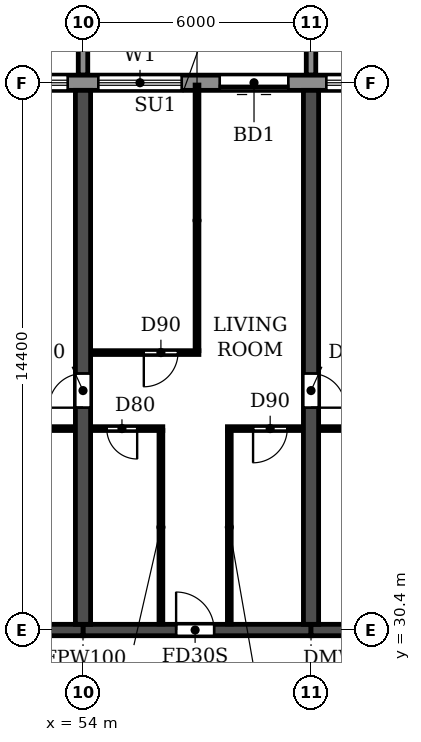
"""IFC4 building model, lengths in metres.
Left out: names, types, materials, properties, quantities, classifications, styles, units other than length and angle.
Written with IfcOpenShell. Run it as: python <this file> out.ifc"""

import sys

from ifc_helpers import new_model, si_unit, direction, frame, frame_2d, origin, place, context, subcontext, project, spatial, polyline, rectangle, outline, extrude, source, transform, mapped, element, fill, save


model = new_model("IFC4")
c1 = context("Model", 3, precision=1e-05, world=origin(), true_north=direction((0.0, 1.0)))
c2 = subcontext(c1, "Body", "Model", "MODEL_VIEW")
j1 = project(units=[si_unit("LENGTHUNIT", "METRE"), si_unit("PLANEANGLEUNIT", "RADIAN")], contexts=[c1])
p1 = place(None, origin())
s1 = spatial("IfcSite", under=j1, at=p1, CompositionType="ELEMENT")
p2 = place(p1, origin())
s2 = spatial("IfcBuilding", under=s1, at=p2, CompositionType="ELEMENT")
p3 = place(p2, frame((0.0, 0.0, 49.8)))
s3 = spatial("IfcBuildingStorey", under=s2, at=p3, CompositionType="ELEMENT", Elevation=49.8)
p4 = place(p3, frame((54.0, 30.55, 0.0), z_axis=(0.0, 0.0, 1.0), x_axis=(0.0, 1.0, 0.0)))
e1 = element("IfcWall", 1, at=p4, inside=s3, PredefinedType="SHEAR", context=c2, shape_type="SweptSolid", body=[
    extrude(rectangle(XDim=14.05, YDim=0.4, at=frame_2d((7.025, 0.0))), origin(), (0.0, 0.0, 1.0), 3.0),
])
p5 = place(p4, frame((5.7, 0.0, 0.0)))
e2 = element("IfcOpeningElement", 2, at=p5, cuts=e1, PredefinedType="OPENING", context=c2, shape_type="SweptSolid", body=[
    extrude(rectangle(XDim=0.9, YDim=2.1, at=frame_2d((0.45, 1.05))), frame((0.0, 0.21, 0.0), z_axis=(0.0, -1.0, 0.0), x_axis=(1.0, 0.0, 0.0)), (0.0, 0.0, 1.0), 0.42),
])
p6 = place(p3, frame((60.0, 30.55, 0.0), z_axis=(0.0, 0.0, 1.0), x_axis=(0.0, 1.0, 0.0)))
e3 = element("IfcWall", 3, at=p6, inside=s3, PredefinedType="SHEAR", context=c2, shape_type="SweptSolid", body=[
    extrude(rectangle(XDim=14.05, YDim=0.4, at=frame_2d((7.025, 0.0))), origin(), (0.0, 0.0, 1.0), 3.0),
])
p7 = place(p6, frame((5.7, 0.0, 0.0)))
e4 = element("IfcOpeningElement", 4, at=p7, cuts=e3, PredefinedType="OPENING", context=c2, shape_type="SweptSolid", body=[
    extrude(rectangle(XDim=0.9, YDim=2.1, at=frame_2d((0.45, 1.05))), frame((0.0, 0.21, 0.0), z_axis=(0.0, -1.0, 0.0), x_axis=(1.0, 0.0, 0.0)), (0.0, 0.0, 1.0), 0.42),
])
p8 = place(p3, frame((48.0, 30.4, 0.0), z_axis=(0.0, 0.0, 1.0), x_axis=(1.0, 0.0, 0.0)))
e5 = element("IfcWall", 5, at=p8, inside=s3, PredefinedType="SHEAR", context=c2, shape_type="SweptSolid", body=[
    extrude(rectangle(XDim=6.0, YDim=0.3, at=frame_2d((3.0, 0.0))), origin(), (0.0, 0.0, 1.0), 2.4),
])
p9 = place(p3, frame((54.0, 30.4, 0.0), z_axis=(0.0, 0.0, 1.0), x_axis=(1.0, 0.0, 0.0)))
e6 = element("IfcWall", 6, at=p9, inside=s3, PredefinedType="SHEAR", context=c2, shape_type="SweptSolid", body=[
    extrude(rectangle(XDim=6.0, YDim=0.3, at=frame_2d((3.0, 0.0))), origin(), (0.0, 0.0, 1.0), 2.4),
])
p10 = place(p9, frame((2.45, 0.0, 0.0)))
e7 = element("IfcOpeningElement", 7, at=p10, cuts=e6, PredefinedType="OPENING", context=c2, shape_type="SweptSolid", body=[
    extrude(rectangle(XDim=1.0, YDim=2.1, at=frame_2d((0.5, 1.05))), frame((0.0, 0.16, 0.0), z_axis=(0.0, -1.0, 0.0), x_axis=(1.0, 0.0, 0.0)), (0.0, 0.0, 1.0), 0.32),
])
p11 = place(p3, frame((60.0, 30.4, 0.0), z_axis=(0.0, 0.0, 1.0), x_axis=(1.0, 0.0, 0.0)))
e8 = element("IfcWall", 8, at=p11, inside=s3, PredefinedType="SHEAR", context=c2, shape_type="SweptSolid", body=[
    extrude(rectangle(XDim=6.0, YDim=0.3, at=frame_2d((3.0, 0.0))), origin(), (0.0, 0.0, 1.0), 2.4),
])
p12 = place(p3, frame((97.317, 44.8, 0.0), z_axis=(0.0, 0.0, 1.0), x_axis=(-1.0, 0.0, 0.0)))
e9 = element("IfcWall", 9, at=p12, inside=s3, PredefinedType="STANDARD", context=c2, shape_type="SweptSolid", body=[
    extrude(rectangle(XDim=92.634, YDim=0.4, at=frame_2d((46.317, 0.0))), origin(), (0.0, 0.0, 1.0), 3.0),
])
p13 = place(p12, frame((88.917, 0.0, 0.0)))
e10 = element("IfcOpeningElement", 10, at=p13, cuts=e9, PredefinedType="OPENING", context=c2, shape_type="SweptSolid", body=[
    extrude(rectangle(XDim=1.8, YDim=2.4, at=frame_2d((0.9, 1.2))), frame((0.0, 0.21, 0.0), z_axis=(0.0, -1.0, 0.0), x_axis=(1.0, 0.0, 0.0)), (0.0, 0.0, 1.0), 0.42),
])
p14 = place(p12, frame((85.717, 0.0, 0.9)))
e11 = element("IfcOpeningElement", 11, at=p14, cuts=e9, PredefinedType="OPENING", context=c2, shape_type="SweptSolid", body=[
    extrude(rectangle(XDim=2.2, YDim=1.5, at=frame_2d((1.1, 0.75))), frame((0.0, 0.21, 0.0), z_axis=(0.0, -1.0, 0.0), x_axis=(1.0, 0.0, 0.0)), (0.0, 0.0, 1.0), 0.42),
])
p15 = place(p12, frame((82.717, 0.0, 0.9)))
e12 = element("IfcOpeningElement", 12, at=p15, cuts=e9, PredefinedType="OPENING", context=c2, shape_type="SweptSolid", body=[
    extrude(rectangle(XDim=2.2, YDim=1.5, at=frame_2d((1.1, 0.75))), frame((0.0, 0.21, 0.0), z_axis=(0.0, -1.0, 0.0), x_axis=(1.0, 0.0, 0.0)), (0.0, 0.0, 1.0), 0.42),
])
p16 = place(p12, frame((79.717, 0.0, 0.9)))
e13 = element("IfcOpeningElement", 13, at=p16, cuts=e9, PredefinedType="OPENING", context=c2, shape_type="SweptSolid", body=[
    extrude(rectangle(XDim=2.2, YDim=1.5, at=frame_2d((1.1, 0.75))), frame((0.0, 0.21, 0.0), z_axis=(0.0, -1.0, 0.0), x_axis=(1.0, 0.0, 0.0)), (0.0, 0.0, 1.0), 0.42),
])
p17 = place(p12, frame((76.717, 0.0, 0.9)))
e14 = element("IfcOpeningElement", 14, at=p17, cuts=e9, PredefinedType="OPENING", context=c2, shape_type="SweptSolid", body=[
    extrude(rectangle(XDim=2.2, YDim=1.5, at=frame_2d((1.1, 0.75))), frame((0.0, 0.21, 0.0), z_axis=(0.0, -1.0, 0.0), x_axis=(1.0, 0.0, 0.0)), (0.0, 0.0, 1.0), 0.42),
])
p18 = place(p12, frame((73.917, 0.0, 0.0)))
e15 = element("IfcOpeningElement", 15, at=p18, cuts=e9, PredefinedType="OPENING", context=c2, shape_type="SweptSolid", body=[
    extrude(rectangle(XDim=1.8, YDim=2.4, at=frame_2d((0.9, 1.2))), frame((0.0, 0.21, 0.0), z_axis=(0.0, -1.0, 0.0), x_axis=(1.0, 0.0, 0.0)), (0.0, 0.0, 1.0), 0.42),
])
p19 = place(p12, frame((70.717, 0.0, 0.9)))
e16 = element("IfcOpeningElement", 16, at=p19, cuts=e9, PredefinedType="OPENING", context=c2, shape_type="SweptSolid", body=[
    extrude(rectangle(XDim=2.2, YDim=1.5, at=frame_2d((1.1, 0.75))), frame((0.0, 0.21, 0.0), z_axis=(0.0, -1.0, 0.0), x_axis=(1.0, 0.0, 0.0)), (0.0, 0.0, 1.0), 0.42),
])
p20 = place(p12, frame((67.717, 0.0, 0.9)))
e17 = element("IfcOpeningElement", 17, at=p20, cuts=e9, PredefinedType="OPENING", context=c2, shape_type="SweptSolid", body=[
    extrude(rectangle(XDim=2.2, YDim=1.5, at=frame_2d((1.1, 0.75))), frame((0.0, 0.21, 0.0), z_axis=(0.0, -1.0, 0.0), x_axis=(1.0, 0.0, 0.0)), (0.0, 0.0, 1.0), 0.42),
])
p21 = place(p12, frame((64.717, 0.0, 0.9)))
e18 = element("IfcOpeningElement", 18, at=p21, cuts=e9, PredefinedType="OPENING", context=c2, shape_type="SweptSolid", body=[
    extrude(rectangle(XDim=2.2, YDim=1.5, at=frame_2d((1.1, 0.75))), frame((0.0, 0.21, 0.0), z_axis=(0.0, -1.0, 0.0), x_axis=(1.0, 0.0, 0.0)), (0.0, 0.0, 1.0), 0.42),
])
p22 = place(p12, frame((61.917, 0.0, 0.0)))
e19 = element("IfcOpeningElement", 19, at=p22, cuts=e9, PredefinedType="OPENING", context=c2, shape_type="SweptSolid", body=[
    extrude(rectangle(XDim=1.8, YDim=2.4, at=frame_2d((0.9, 1.2))), frame((0.0, 0.21, 0.0), z_axis=(0.0, -1.0, 0.0), x_axis=(1.0, 0.0, 0.0)), (0.0, 0.0, 1.0), 0.42),
])
p23 = place(p12, frame((58.717, 0.0, 0.9)))
e20 = element("IfcOpeningElement", 20, at=p23, cuts=e9, PredefinedType="OPENING", context=c2, shape_type="SweptSolid", body=[
    extrude(rectangle(XDim=2.2, YDim=1.5, at=frame_2d((1.1, 0.75))), frame((0.0, 0.21, 0.0), z_axis=(0.0, -1.0, 0.0), x_axis=(1.0, 0.0, 0.0)), (0.0, 0.0, 1.0), 0.42),
])
p24 = place(p12, frame((55.717, 0.0, 0.9)))
e21 = element("IfcOpeningElement", 21, at=p24, cuts=e9, PredefinedType="OPENING", context=c2, shape_type="SweptSolid", body=[
    extrude(rectangle(XDim=2.2, YDim=1.5, at=frame_2d((1.1, 0.75))), frame((0.0, 0.21, 0.0), z_axis=(0.0, -1.0, 0.0), x_axis=(1.0, 0.0, 0.0)), (0.0, 0.0, 1.0), 0.42),
])
p25 = place(p12, frame((52.717, 0.0, 0.9)))
e22 = element("IfcOpeningElement", 22, at=p25, cuts=e9, PredefinedType="OPENING", context=c2, shape_type="SweptSolid", body=[
    extrude(rectangle(XDim=2.2, YDim=1.5, at=frame_2d((1.1, 0.75))), frame((0.0, 0.21, 0.0), z_axis=(0.0, -1.0, 0.0), x_axis=(1.0, 0.0, 0.0)), (0.0, 0.0, 1.0), 0.42),
])
p26 = place(p12, frame((49.917, 0.0, 0.0)))
e23 = element("IfcOpeningElement", 23, at=p26, cuts=e9, PredefinedType="OPENING", context=c2, shape_type="SweptSolid", body=[
    extrude(rectangle(XDim=1.8, YDim=2.4, at=frame_2d((0.9, 1.2))), frame((0.0, 0.21, 0.0), z_axis=(0.0, -1.0, 0.0), x_axis=(1.0, 0.0, 0.0)), (0.0, 0.0, 1.0), 0.42),
])
p27 = place(p12, frame((46.717, 0.0, 0.9)))
e24 = element("IfcOpeningElement", 24, at=p27, cuts=e9, PredefinedType="OPENING", context=c2, shape_type="SweptSolid", body=[
    extrude(rectangle(XDim=2.2, YDim=1.5, at=frame_2d((1.1, 0.75))), frame((0.0, 0.21, 0.0), z_axis=(0.0, -1.0, 0.0), x_axis=(1.0, 0.0, 0.0)), (0.0, 0.0, 1.0), 0.42),
])
p28 = place(p12, frame((43.717, 0.0, 0.9)))
e25 = element("IfcOpeningElement", 25, at=p28, cuts=e9, PredefinedType="OPENING", context=c2, shape_type="SweptSolid", body=[
    extrude(rectangle(XDim=2.2, YDim=1.5, at=frame_2d((1.1, 0.75))), frame((0.0, 0.21, 0.0), z_axis=(0.0, -1.0, 0.0), x_axis=(1.0, 0.0, 0.0)), (0.0, 0.0, 1.0), 0.42),
])
p29 = place(p12, frame((40.717, 0.0, 0.9)))
e26 = element("IfcOpeningElement", 26, at=p29, cuts=e9, PredefinedType="OPENING", context=c2, shape_type="SweptSolid", body=[
    extrude(rectangle(XDim=2.2, YDim=1.5, at=frame_2d((1.1, 0.75))), frame((0.0, 0.21, 0.0), z_axis=(0.0, -1.0, 0.0), x_axis=(1.0, 0.0, 0.0)), (0.0, 0.0, 1.0), 0.42),
])
p30 = place(p12, frame((37.917, 0.0, 0.0)))
e27 = element("IfcOpeningElement", 27, at=p30, cuts=e9, PredefinedType="OPENING", context=c2, shape_type="SweptSolid", body=[
    extrude(rectangle(XDim=1.8, YDim=2.4, at=frame_2d((0.9, 1.2))), frame((0.0, 0.21, 0.0), z_axis=(0.0, -1.0, 0.0), x_axis=(1.0, 0.0, 0.0)), (0.0, 0.0, 1.0), 0.42),
])
p31 = place(p12, frame((34.717, 0.0, 0.9)))
e28 = element("IfcOpeningElement", 28, at=p31, cuts=e9, PredefinedType="OPENING", context=c2, shape_type="SweptSolid", body=[
    extrude(rectangle(XDim=2.2, YDim=1.5, at=frame_2d((1.1, 0.75))), frame((0.0, 0.21, 0.0), z_axis=(0.0, -1.0, 0.0), x_axis=(1.0, 0.0, 0.0)), (0.0, 0.0, 1.0), 0.42),
])
p32 = place(p12, frame((31.717, 0.0, 0.9)))
e29 = element("IfcOpeningElement", 29, at=p32, cuts=e9, PredefinedType="OPENING", context=c2, shape_type="SweptSolid", body=[
    extrude(rectangle(XDim=2.2, YDim=1.5, at=frame_2d((1.1, 0.75))), frame((0.0, 0.21, 0.0), z_axis=(0.0, -1.0, 0.0), x_axis=(1.0, 0.0, 0.0)), (0.0, 0.0, 1.0), 0.42),
])
p33 = place(p12, frame((28.717, 0.0, 0.9)))
e30 = element("IfcOpeningElement", 30, at=p33, cuts=e9, PredefinedType="OPENING", context=c2, shape_type="SweptSolid", body=[
    extrude(rectangle(XDim=2.2, YDim=1.5, at=frame_2d((1.1, 0.75))), frame((0.0, 0.21, 0.0), z_axis=(0.0, -1.0, 0.0), x_axis=(1.0, 0.0, 0.0)), (0.0, 0.0, 1.0), 0.42),
])
p34 = place(p12, frame((25.917, 0.0, 0.0)))
e31 = element("IfcOpeningElement", 31, at=p34, cuts=e9, PredefinedType="OPENING", context=c2, shape_type="SweptSolid", body=[
    extrude(rectangle(XDim=1.8, YDim=2.4, at=frame_2d((0.9, 1.2))), frame((0.0, 0.21, 0.0), z_axis=(0.0, -1.0, 0.0), x_axis=(1.0, 0.0, 0.0)), (0.0, 0.0, 1.0), 0.42),
])
p35 = place(p12, frame((22.917, 0.0, 0.0)))
e32 = element("IfcOpeningElement", 32, at=p35, cuts=e9, PredefinedType="OPENING", context=c2, shape_type="SweptSolid", body=[
    extrude(rectangle(XDim=1.8, YDim=2.4, at=frame_2d((0.9, 1.2))), frame((0.0, 0.21, 0.0), z_axis=(0.0, -1.0, 0.0), x_axis=(1.0, 0.0, 0.0)), (0.0, 0.0, 1.0), 0.42),
])
p36 = place(p12, frame((19.717, 0.0, 0.9)))
e33 = element("IfcOpeningElement", 33, at=p36, cuts=e9, PredefinedType="OPENING", context=c2, shape_type="SweptSolid", body=[
    extrude(rectangle(XDim=2.2, YDim=1.5, at=frame_2d((1.1, 0.75))), frame((0.0, 0.21, 0.0), z_axis=(0.0, -1.0, 0.0), x_axis=(1.0, 0.0, 0.0)), (0.0, 0.0, 1.0), 0.42),
])
p37 = place(p12, frame((16.717, 0.0, 0.9)))
e34 = element("IfcOpeningElement", 34, at=p37, cuts=e9, PredefinedType="OPENING", context=c2, shape_type="SweptSolid", body=[
    extrude(rectangle(XDim=2.2, YDim=1.5, at=frame_2d((1.1, 0.75))), frame((0.0, 0.21, 0.0), z_axis=(0.0, -1.0, 0.0), x_axis=(1.0, 0.0, 0.0)), (0.0, 0.0, 1.0), 0.42),
])
p38 = place(p12, frame((13.717, 0.0, 0.9)))
e35 = element("IfcOpeningElement", 35, at=p38, cuts=e9, PredefinedType="OPENING", context=c2, shape_type="SweptSolid", body=[
    extrude(rectangle(XDim=2.2, YDim=1.5, at=frame_2d((1.1, 0.75))), frame((0.0, 0.21, 0.0), z_axis=(0.0, -1.0, 0.0), x_axis=(1.0, 0.0, 0.0)), (0.0, 0.0, 1.0), 0.42),
])
p39 = place(p12, frame((10.717, 0.0, 0.9)))
e36 = element("IfcOpeningElement", 36, at=p39, cuts=e9, PredefinedType="OPENING", context=c2, shape_type="SweptSolid", body=[
    extrude(rectangle(XDim=2.2, YDim=1.5, at=frame_2d((1.1, 0.75))), frame((0.0, 0.21, 0.0), z_axis=(0.0, -1.0, 0.0), x_axis=(1.0, 0.0, 0.0)), (0.0, 0.0, 1.0), 0.42),
])
p40 = place(p12, frame((7.917, 0.0, 0.0)))
e37 = element("IfcOpeningElement", 37, at=p40, cuts=e9, PredefinedType="OPENING", context=c2, shape_type="SweptSolid", body=[
    extrude(rectangle(XDim=1.8, YDim=2.4, at=frame_2d((0.9, 1.2))), frame((0.0, 0.21, 0.0), z_axis=(0.0, -1.0, 0.0), x_axis=(1.0, 0.0, 0.0)), (0.0, 0.0, 1.0), 0.42),
])
p41 = place(p12, frame((4.717, 0.0, 0.9)))
e38 = element("IfcOpeningElement", 38, at=p41, cuts=e9, PredefinedType="OPENING", context=c2, shape_type="SweptSolid", body=[
    extrude(rectangle(XDim=2.2, YDim=1.5, at=frame_2d((1.1, 0.75))), frame((0.0, 0.21, 0.0), z_axis=(0.0, -1.0, 0.0), x_axis=(1.0, 0.0, 0.0)), (0.0, 0.0, 1.0), 0.42),
])
p42 = place(p12, frame((1.917, 0.0, 0.0)))
e39 = element("IfcOpeningElement", 39, at=p42, cuts=e9, PredefinedType="OPENING", context=c2, shape_type="SweptSolid", body=[
    extrude(rectangle(XDim=1.8, YDim=2.4, at=frame_2d((0.9, 1.2))), frame((0.0, 0.21, 0.0), z_axis=(0.0, -1.0, 0.0), x_axis=(1.0, 0.0, 0.0)), (0.0, 0.0, 1.0), 0.42),
])
m1 = source(origin(), c2, "Body", "SweptSolid", [
    extrude(outline(polyline([(0.0, 0.0), (0.25, 0.0), (0.25, 3.1), (0.0, 3.1), (0.0, 0.0)])), origin(), (0.0, 0.0, 1.0), 3.1),
])
for number, where in (
    (40, (53.875, 45.0, 0.0)),
    (41, (59.875, 45.0, 0.0)),
):
    element("IfcWall", number, at=place(p3, frame(where)), inside=s3, PredefinedType="STANDARD", context=c2, shape_type="MappedRepresentation", body=[
        mapped(m1, transform((0.0, 0.0, 0.0))),
    ])
p43 = place(p3, frame((51.1, 35.7, 0.0), z_axis=(0.0, 0.0, 1.0), x_axis=(1.0, 0.0, 0.0)))
e42 = element("IfcWall", 42, at=p43, inside=s3, PredefinedType="PARTITIONING", context=c2, shape_type="SweptSolid", body=[
    extrude(rectangle(XDim=2.69, YDim=0.1, at=frame_2d((1.345, 0.0))), origin(), (0.0, 0.0, 1.0), 3.0),
])
p44 = place(p43, frame((1.0, 0.0, 0.0)))
e43 = element("IfcOpeningElement", 43, at=p44, cuts=e42, PredefinedType="OPENING", context=c2, shape_type="SweptSolid", body=[
    extrude(rectangle(XDim=0.8, YDim=2.1, at=frame_2d((0.4, 1.05))), frame((0.0, 0.06, 0.0), z_axis=(0.0, -1.0, 0.0), x_axis=(1.0, 0.0, 0.0)), (0.0, 0.0, 1.0), 0.12),
])
p45 = place(p3, frame((54.21, 35.7, 0.0), z_axis=(0.0, 0.0, 1.0), x_axis=(1.0, 0.0, 0.0)))
e44 = element("IfcWall", 44, at=p45, inside=s3, PredefinedType="PARTITIONING", context=c2, shape_type="SweptSolid", body=[
    extrude(rectangle(XDim=1.89, YDim=0.1, at=frame_2d((0.945, 0.0))), origin(), (0.0, 0.0, 1.0), 3.0),
])
p46 = place(p45, frame((0.415, 0.0, 0.0)))
e45 = element("IfcOpeningElement", 45, at=p46, cuts=e44, PredefinedType="OPENING", context=c2, shape_type="SweptSolid", body=[
    extrude(rectangle(XDim=0.8, YDim=2.1, at=frame_2d((0.4, 1.05))), frame((0.0, 0.06, 0.0), z_axis=(0.0, -1.0, 0.0), x_axis=(1.0, 0.0, 0.0)), (0.0, 0.0, 1.0), 0.12),
])
p47 = place(p3, frame((57.8, 35.7, 0.0), z_axis=(0.0, 0.0, 1.0), x_axis=(1.0, 0.0, 0.0)))
e46 = element("IfcWall", 46, at=p47, inside=s3, PredefinedType="PARTITIONING", context=c2, shape_type="SweptSolid", body=[
    extrude(rectangle(XDim=1.99, YDim=0.1, at=frame_2d((0.995, 0.0))), origin(), (0.0, 0.0, 1.0), 3.0),
])
p48 = place(p47, frame((0.675, 0.0, 0.0)))
e47 = element("IfcOpeningElement", 47, at=p48, cuts=e46, PredefinedType="OPENING", context=c2, shape_type="SweptSolid", body=[
    extrude(rectangle(XDim=0.9, YDim=2.1, at=frame_2d((0.45, 1.05))), frame((0.0, 0.06, 0.0), z_axis=(0.0, -1.0, 0.0), x_axis=(1.0, 0.0, 0.0)), (0.0, 0.0, 1.0), 0.12),
])
p49 = place(p3, frame((60.21, 35.7, 0.0), z_axis=(0.0, 0.0, 1.0), x_axis=(1.0, 0.0, 0.0)))
e48 = element("IfcWall", 48, at=p49, inside=s3, PredefinedType="PARTITIONING", context=c2, shape_type="SweptSolid", body=[
    extrude(rectangle(XDim=2.89, YDim=0.1, at=frame_2d((1.445, 0.0))), origin(), (0.0, 0.0, 1.0), 3.0),
])
p50 = place(p49, frame((0.89, 0.0, 0.0)))
e49 = element("IfcOpeningElement", 49, at=p50, cuts=e48, PredefinedType="OPENING", context=c2, shape_type="SweptSolid", body=[
    extrude(rectangle(XDim=0.8, YDim=2.1, at=frame_2d((0.4, 1.05))), frame((0.0, 0.06, 0.0), z_axis=(0.0, -1.0, 0.0), x_axis=(1.0, 0.0, 0.0)), (0.0, 0.0, 1.0), 0.12),
])
p51 = place(p3, frame((54.21, 37.7, 0.0), z_axis=(0.0, 0.0, 1.0), x_axis=(1.0, 0.0, 0.0)))
e50 = element("IfcWall", 50, at=p51, inside=s3, PredefinedType="PARTITIONING", context=c2, shape_type="SweptSolid", body=[
    extrude(rectangle(XDim=2.84, YDim=0.1, at=frame_2d((1.42, 0.0))), origin(), (0.0, 0.0, 1.0), 3.0),
])
p52 = place(p51, frame((1.39, 0.0, 0.0)))
e51 = element("IfcOpeningElement", 51, at=p52, cuts=e50, PredefinedType="OPENING", context=c2, shape_type="SweptSolid", body=[
    extrude(rectangle(XDim=0.9, YDim=2.1, at=frame_2d((0.45, 1.05))), frame((0.0, 0.06, 0.0), z_axis=(0.0, -1.0, 0.0), x_axis=(1.0, 0.0, 0.0)), (0.0, 0.0, 1.0), 0.12),
])
p53 = place(p3, frame((56.05, 30.56, 0.0), z_axis=(0.0, 0.0, 1.0), x_axis=(0.0, 1.0, 0.0)))
e52 = element("IfcWall", 52, at=p53, inside=s3, PredefinedType="PARTITIONING", context=c2, shape_type="SweptSolid", body=[
    extrude(rectangle(XDim=5.09, YDim=0.1, at=frame_2d((2.545, 0.0))), origin(), (0.0, 0.0, 1.0), 3.0),
])
p54 = place(p3, frame((57.0, 37.75, 0.0), z_axis=(0.0, 0.0, 1.0), x_axis=(0.0, 1.0, 0.0)))
e53 = element("IfcWall", 53, at=p54, inside=s3, PredefinedType="PARTITIONING", context=c2, shape_type="SweptSolid", body=[
    extrude(rectangle(XDim=6.99, YDim=0.1, at=frame_2d((3.495, 0.0))), origin(), (0.0, 0.0, 1.0), 3.0),
])
p55 = place(p3, frame((57.85, 30.56, 0.0), z_axis=(0.0, 0.0, 1.0), x_axis=(0.0, 1.0, 0.0)))
e54 = element("IfcWall", 54, at=p55, inside=s3, PredefinedType="PARTITIONING", context=c2, shape_type="SweptSolid", body=[
    extrude(rectangle(XDim=5.09, YDim=0.1, at=frame_2d((2.545, 0.0))), origin(), (0.0, 0.0, 1.0), 3.0),
])
p56 = place(p28, origin())
e55 = element("IfcWindow", 55, at=p56, inside=s3, PartitioningType="DOUBLE_PANEL_HORIZONTAL", PredefinedType="WINDOW", context=c2, shape_type="SweptSolid", body=[
    extrude(rectangle(XDim=2.2, YDim=1.5, at=frame_2d((1.1, 0.75))), frame((0.0, 0.03, 0.0), z_axis=(0.0, -1.0, 0.0), x_axis=(1.0, 0.0, 0.0)), (0.0, 0.0, 1.0), 0.06),
])
fill(e25, e55)
p57 = place(p29, origin())
e56 = element("IfcWindow", 56, at=p57, inside=s3, PartitioningType="DOUBLE_PANEL_HORIZONTAL", PredefinedType="WINDOW", context=c2, shape_type="SweptSolid", body=[
    extrude(rectangle(XDim=2.2, YDim=1.5, at=frame_2d((1.1, 0.75))), frame((0.0, 0.03, 0.0), z_axis=(0.0, -1.0, 0.0), x_axis=(1.0, 0.0, 0.0)), (0.0, 0.0, 1.0), 0.06),
])
fill(e26, e56)
p58 = place(p30, origin())
e57 = element("IfcDoor", 57, at=p58, inside=s3, OperationType="DOUBLE_DOOR_SLIDING", PredefinedType="DOOR", context=c2, shape_type="SweptSolid", body=[
    extrude(rectangle(XDim=1.8, YDim=2.4, at=frame_2d((0.9, 1.2))), frame((0.0, 0.025, 0.0), z_axis=(0.0, -1.0, 0.0), x_axis=(1.0, 0.0, 0.0)), (0.0, 0.0, 1.0), 0.05),
])
fill(e27, e57)
p59 = place(p31, origin())
e58 = element("IfcWindow", 58, at=p59, inside=s3, PartitioningType="DOUBLE_PANEL_HORIZONTAL", PredefinedType="WINDOW", context=c2, shape_type="SweptSolid", body=[
    extrude(rectangle(XDim=2.2, YDim=1.5, at=frame_2d((1.1, 0.75))), frame((0.0, 0.03, 0.0), z_axis=(0.0, -1.0, 0.0), x_axis=(1.0, 0.0, 0.0)), (0.0, 0.0, 1.0), 0.06),
])
fill(e28, e58)
p60 = place(p5, origin())
e59 = element("IfcDoor", 59, at=p60, inside=s3, OperationType="SINGLE_SWING_LEFT", PredefinedType="DOOR", context=c2, shape_type="SweptSolid", body=[
    extrude(rectangle(XDim=0.9, YDim=2.1, at=frame_2d((0.45, 1.05))), frame((0.0, 0.025, 0.0), z_axis=(0.0, -1.0, 0.0), x_axis=(1.0, 0.0, 0.0)), (0.0, 0.0, 1.0), 0.05),
])
fill(e2, e59)
p61 = place(p46, frame((0.8, 0.0, 0.0), z_axis=(0.0, 0.0, 1.0), x_axis=(-1.0, 0.0, 0.0)))
e60 = element("IfcDoor", 60, at=p61, inside=s3, OperationType="SINGLE_SWING_LEFT", PredefinedType="DOOR", context=c2, shape_type="SweptSolid", body=[
    extrude(rectangle(XDim=0.8, YDim=2.1, at=frame_2d((0.4, 1.05))), frame((0.0, 0.025, 0.0), z_axis=(0.0, -1.0, 0.0), x_axis=(1.0, 0.0, 0.0)), (0.0, 0.0, 1.0), 0.05),
])
fill(e45, e60)
p62 = place(p52, frame((0.9, 0.0, 0.0), z_axis=(0.0, 0.0, 1.0), x_axis=(-1.0, 0.0, 0.0)))
e61 = element("IfcDoor", 61, at=p62, inside=s3, OperationType="SINGLE_SWING_RIGHT", PredefinedType="DOOR", context=c2, shape_type="SweptSolid", body=[
    extrude(rectangle(XDim=0.9, YDim=2.1, at=frame_2d((0.45, 1.05))), frame((0.0, 0.025, 0.0), z_axis=(0.0, -1.0, 0.0), x_axis=(1.0, 0.0, 0.0)), (0.0, 0.0, 1.0), 0.05),
])
fill(e51, e61)
p63 = place(p10, origin())
e62 = element("IfcDoor", 62, at=p63, inside=s3, OperationType="SINGLE_SWING_LEFT", PredefinedType="DOOR", context=c2, shape_type="SweptSolid", body=[
    extrude(rectangle(XDim=1.0, YDim=2.1, at=frame_2d((0.5, 1.05))), frame((0.0, 0.025, 0.0), z_axis=(0.0, -1.0, 0.0), x_axis=(1.0, 0.0, 0.0)), (0.0, 0.0, 1.0), 0.05),
])
fill(e7, e62)
p64 = place(p48, frame((0.9, 0.0, 0.0), z_axis=(0.0, 0.0, 1.0), x_axis=(-1.0, 0.0, 0.0)))
e63 = element("IfcDoor", 63, at=p64, inside=s3, OperationType="SINGLE_SWING_RIGHT", PredefinedType="DOOR", context=c2, shape_type="SweptSolid", body=[
    extrude(rectangle(XDim=0.9, YDim=2.1, at=frame_2d((0.45, 1.05))), frame((0.0, 0.025, 0.0), z_axis=(0.0, -1.0, 0.0), x_axis=(1.0, 0.0, 0.0)), (0.0, 0.0, 1.0), 0.05),
])
fill(e47, e63)
p65 = place(p7, frame((0.9, 0.0, 0.0), z_axis=(0.0, 0.0, 1.0), x_axis=(-1.0, 0.0, 0.0)))
e64 = element("IfcDoor", 64, at=p65, inside=s3, OperationType="SINGLE_SWING_RIGHT", PredefinedType="DOOR", context=c2, shape_type="SweptSolid", body=[
    extrude(rectangle(XDim=0.9, YDim=2.1, at=frame_2d((0.45, 1.05))), frame((0.0, 0.025, 0.0), z_axis=(0.0, -1.0, 0.0), x_axis=(1.0, 0.0, 0.0)), (0.0, 0.0, 1.0), 0.05),
])
fill(e4, e64)
save(model, sys.argv[1])
